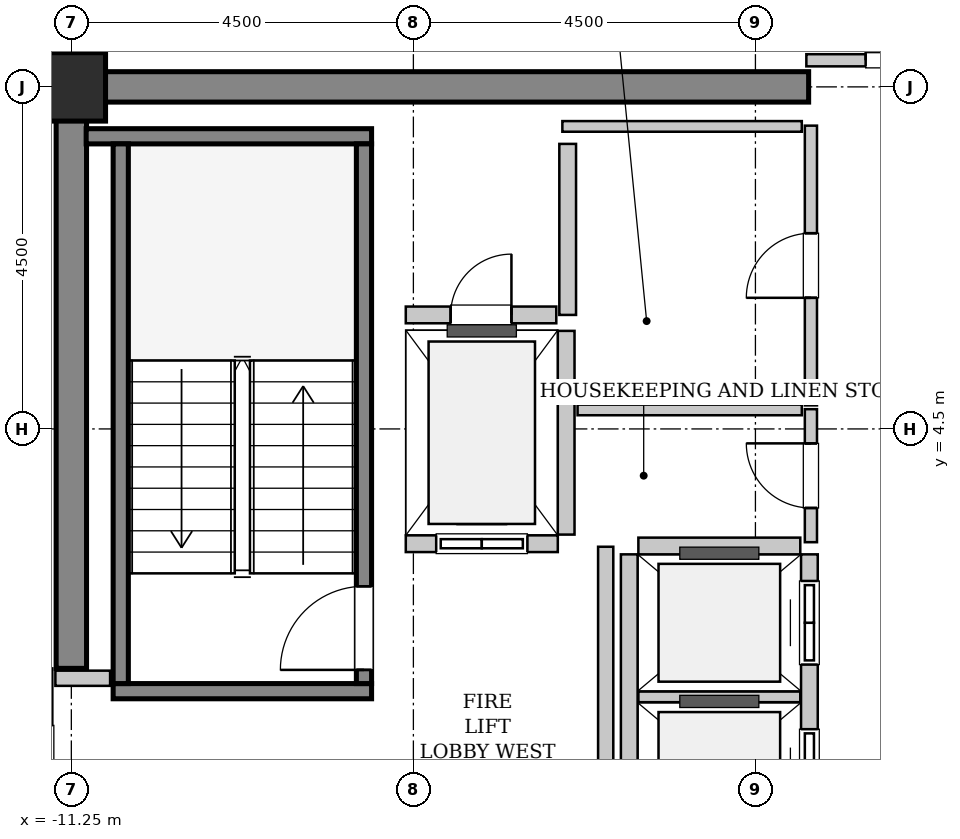
"""IFC4 building model, lengths in metres.
Left out: names, types, materials, properties, quantities, classifications, styles, units other than length and angle.
Written with IfcOpenShell. Run it as: python <this file> out.ifc"""

import sys

from ifc_helpers import new_model, si_unit, direction, frame, frame_2d, origin, origin_2d, place, context, subcontext, project, spatial, rectangle, extrude, source, transform, mapped, element, fill, save


model = new_model("IFC4")
c1 = context("Model", 3, precision=1e-05, world=origin(), true_north=direction((0.0, 1.0)))
c2 = subcontext(c1, "Body", "Model", "MODEL_VIEW")
j1 = project(units=[si_unit("LENGTHUNIT", "METRE"), si_unit("PLANEANGLEUNIT", "RADIAN")], contexts=[c1])
p1 = place(None, origin())
s1 = spatial("IfcSite", under=j1, at=p1, CompositionType="ELEMENT")
p2 = place(p1, origin())
s2 = spatial("IfcBuilding", under=s1, at=p2, CompositionType="ELEMENT")
p3 = place(p2, frame((0.0, 0.0, 345.2)))
s3 = spatial("IfcBuildingStorey", under=s2, at=p3, CompositionType="ELEMENT", Elevation=345.2)
m1 = source(origin(), c2, "Body", "SweptSolid", [
    extrude(rectangle(XDim=9.9, YDim=0.4, at=frame_2d((4.95, 0.0))), origin(), (0.0, 0.0, 1.0), 3.8),
])
p4 = place(p3, frame((-11.45, 9.0, 0.0), z_axis=(0.0, 0.0, 1.0), x_axis=(1.0, 0.0, 0.0)))
e1 = element("IfcWall", 1, at=p4, inside=s3, PredefinedType="SHEAR", context=c2, shape_type="MappedRepresentation", body=[
    mapped(m1, transform((0.0, 0.0, 0.0), x_axis=(1.0, 0.0, 0.0), y_axis=(0.0, 1.0, 0.0), z_axis=(0.0, 0.0, 1.0), scale=1.0)),
])
m2 = source(origin(), c2, "Body", "SweptSolid", [
    extrude(rectangle(XDim=7.45, YDim=0.4, at=frame_2d((3.725, 0.0))), origin(), (0.0, 0.0, 1.0), 3.8),
])
p5 = place(p3, frame((-11.25, 1.35, 0.0), z_axis=(0.0, 0.0, 1.0), x_axis=(0.0, 1.0, 0.0)))
e2 = element("IfcWall", 2, at=p5, inside=s3, PredefinedType="SHEAR", context=c2, shape_type="MappedRepresentation", body=[
    mapped(m2, transform((0.0, 0.0, 0.0), x_axis=(1.0, 0.0, 0.0), y_axis=(0.0, 1.0, 0.0), z_axis=(0.0, 0.0, 1.0), scale=1.0)),
])
m3 = source(origin(), c2, "Body", "SweptSolid", [
    extrude(rectangle(XDim=0.9, YDim=0.9, at=origin_2d()), origin(), (0.0, 0.0, 1.0), 3.8),
])
p6 = place(p3, frame((-11.25, 9.0, 0.0), z_axis=(0.0, 0.0, 1.0), x_axis=(1.0, 0.0, 0.0)))
e3 = element("IfcColumn", 3, at=p6, inside=s3, PredefinedType="COLUMN", context=c2, shape_type="MappedRepresentation", body=[
    mapped(m3, transform((0.0, 0.0, 0.0), x_axis=(1.0, 0.0, 0.0), y_axis=(0.0, 1.0, 0.0), z_axis=(0.0, 0.0, 1.0), scale=1.0)),
])
m4 = source(origin(), c2, "Body", "SweptSolid", [
    extrude(rectangle(XDim=3.4, YDim=0.2, at=frame_2d((1.7, 0.0))), origin(), (0.0, 0.0, 1.0), 3.8),
])
p7 = place(p3, frame((-7.3, 1.05, 0.0), z_axis=(0.0, 0.0, 1.0), x_axis=(-1.0, 0.0, 0.0)))
e4 = element("IfcWall", 4, at=p7, inside=s3, PredefinedType="SOLIDWALL", context=c2, shape_type="MappedRepresentation", body=[
    mapped(m4, transform((0.0, 0.0, 0.0), x_axis=(1.0, 0.0, 0.0), y_axis=(0.0, 1.0, 0.0), z_axis=(0.0, 0.0, 1.0), scale=1.0)),
])
m5 = source(origin(), c2, "Body", "SweptSolid", [
    extrude(rectangle(XDim=3.755, YDim=0.2, at=frame_2d((1.877, 0.0))), origin(), (0.0, 0.0, 1.0), 3.8),
])
p8 = place(p3, frame((-7.3, 8.35, 0.0), z_axis=(0.0, 0.0, 1.0), x_axis=(-1.0, 0.0, 0.0)))
e5 = element("IfcWall", 5, at=p8, inside=s3, PredefinedType="SOLIDWALL", context=c2, shape_type="MappedRepresentation", body=[
    mapped(m5, transform((0.0, 0.0, 0.0), x_axis=(1.0, 0.0, 0.0), y_axis=(0.0, 1.0, 0.0), z_axis=(0.0, 0.0, 1.0), scale=1.0)),
])
m6 = source(origin(), c2, "Body", "SweptSolid", [
    extrude(rectangle(XDim=7.1, YDim=0.2, at=frame_2d((3.55, 0.0))), origin(), (0.0, 0.0, 1.0), 3.8),
])
p9 = place(p3, frame((-7.4, 1.15, 0.0), z_axis=(0.0, 0.0, 1.0), x_axis=(0.0, 1.0, 0.0)))
e6 = element("IfcWall", 6, at=p9, inside=s3, PredefinedType="SOLIDWALL", context=c2, shape_type="MappedRepresentation", body=[
    mapped(m6, transform((0.0, 0.0, 0.0), x_axis=(1.0, 0.0, 0.0), y_axis=(0.0, 1.0, 0.0), z_axis=(0.0, 0.0, 1.0), scale=1.0)),
])
p10 = place(p9, frame((0.18, 0.0, 0.0)))
e7 = element("IfcOpeningElement", 7, at=p10, cuts=e6, PredefinedType="OPENING", context=c2, shape_type="SweptSolid", body=[
    extrude(rectangle(XDim=1.1, YDim=2.15, at=frame_2d((0.55, 1.075))), frame((0.0, 0.11, 0.0), z_axis=(0.0, -1.0, 0.0), x_axis=(1.0, 0.0, 0.0)), (0.0, 0.0, 1.0), 0.22),
])
p11 = place(p3, frame((-10.6, 1.15, 0.0), z_axis=(0.0, 0.0, 1.0), x_axis=(0.0, 1.0, 0.0)))
e8 = element("IfcWall", 8, at=p11, inside=s3, PredefinedType="SOLIDWALL", context=c2, shape_type="MappedRepresentation", body=[
    mapped(m6, transform((0.0, 0.0, 0.0), x_axis=(1.0, 0.0, 0.0), y_axis=(0.0, 1.0, 0.0), z_axis=(0.0, 0.0, 1.0), scale=1.0)),
])
m7 = source(origin(), c2, "Body", "SweptSolid", [
    extrude(rectangle(XDim=2.0, YDim=0.22, at=frame_2d((1.0, 0.0))), origin(), (0.0, 0.0, 1.0), 3.485),
])
p12 = place(p3, frame((-6.85, 2.99, 0.0), z_axis=(0.0, 0.0, 1.0), x_axis=(1.0, 0.0, 0.0)))
e9 = element("IfcWall", 9, at=p12, inside=s3, PredefinedType="SOLIDWALL", context=c2, shape_type="MappedRepresentation", body=[
    mapped(m7, transform((0.0, 0.0, 0.0), x_axis=(1.0, 0.0, 0.0), y_axis=(0.0, 1.0, 0.0), z_axis=(0.0, 0.0, 1.0), scale=1.0)),
])
p13 = place(p12, frame((0.4, 0.0, 0.0)))
e10 = element("IfcOpeningElement", 10, at=p13, cuts=e9, PredefinedType="OPENING", context=c2, shape_type="SweptSolid", body=[
    extrude(rectangle(XDim=1.2, YDim=2.2, at=frame_2d((0.6, 1.1))), frame((0.0, 0.12, 0.0), z_axis=(0.0, -1.0, 0.0), x_axis=(1.0, 0.0, 0.0)), (0.0, 0.0, 1.0), 0.24),
])
m8 = source(origin(), c2, "Body", "SweptSolid", [
    extrude(rectangle(XDim=2.68, YDim=0.22, at=frame_2d((1.34, 0.0))), origin(), (0.0, 0.0, 1.0), 3.485),
])
p14 = place(p3, frame((-4.74, 3.11, 0.0), z_axis=(0.0, 0.0, 1.0), x_axis=(0.0, 1.0, 0.0)))
e11 = element("IfcWall", 11, at=p14, inside=s3, PredefinedType="SOLIDWALL", context=c2, shape_type="MappedRepresentation", body=[
    mapped(m8, transform((0.0, 0.0, 0.0), x_axis=(1.0, 0.0, 0.0), y_axis=(0.0, 1.0, 0.0), z_axis=(0.0, 0.0, 1.0), scale=1.0)),
])
m9 = source(origin(), c2, "Body", "SweptSolid", [
    extrude(rectangle(XDim=5.7, YDim=0.22, at=frame_2d((2.85, 0.0))), origin(), (0.0, 0.0, 1.0), 3.485),
])
p15 = place(p3, frame((-1.54, -2.85, 0.0), z_axis=(0.0, 0.0, 1.0), x_axis=(0.0, 1.0, 0.0)))
e12 = element("IfcWall", 12, at=p15, inside=s3, PredefinedType="SOLIDWALL", context=c2, shape_type="MappedRepresentation", body=[
    mapped(m9, transform((0.0, 0.0, 0.0), x_axis=(1.0, 0.0, 0.0), y_axis=(0.0, 1.0, 0.0), z_axis=(0.0, 0.0, 1.0), scale=1.0)),
])
p16 = place(p15, frame((0.35, 0.0, 0.0)))
e13 = element("IfcOpeningElement", 13, at=p16, cuts=e12, PredefinedType="OPENING", context=c2, shape_type="SweptSolid", body=[
    extrude(rectangle(XDim=1.1, YDim=2.2, at=frame_2d((0.55, 1.1))), frame((0.0, 0.12, 0.0), z_axis=(0.0, -1.0, 0.0), x_axis=(1.0, 0.0, 0.0)), (0.0, 0.0, 1.0), 0.24),
])
p17 = place(p15, frame((2.3, 0.0, 0.0)))
e14 = element("IfcOpeningElement", 14, at=p17, cuts=e12, PredefinedType="OPENING", context=c2, shape_type="SweptSolid", body=[
    extrude(rectangle(XDim=1.1, YDim=2.2, at=frame_2d((0.55, 1.1))), frame((0.0, 0.12, 0.0), z_axis=(0.0, -1.0, 0.0), x_axis=(1.0, 0.0, 0.0)), (0.0, 0.0, 1.0), 0.24),
])
p18 = place(p15, frame((4.25, 0.0, 0.0)))
e15 = element("IfcOpeningElement", 15, at=p18, cuts=e12, PredefinedType="OPENING", context=c2, shape_type="SweptSolid", body=[
    extrude(rectangle(XDim=1.1, YDim=2.2, at=frame_2d((0.55, 1.1))), frame((0.0, 0.12, 0.0), z_axis=(0.0, -1.0, 0.0), x_axis=(1.0, 0.0, 0.0)), (0.0, 0.0, 1.0), 0.24),
])
p19 = place(p3, frame((-3.91, 2.85, 0.0), z_axis=(0.0, 0.0, 1.0), x_axis=(0.0, -1.0, 0.0)))
e16 = element("IfcWall", 16, at=p19, inside=s3, PredefinedType="SOLIDWALL", context=c2, shape_type="MappedRepresentation", body=[
    mapped(m9, transform((0.0, 0.0, 0.0), x_axis=(1.0, 0.0, 0.0), y_axis=(0.0, 1.0, 0.0), z_axis=(0.0, 0.0, 1.0), scale=1.0)),
])
m10 = source(origin(), c2, "Body", "SweptSolid", [
    extrude(rectangle(XDim=2.13, YDim=0.14, at=frame_2d((1.065, 0.0))), origin(), (0.0, 0.0, 1.0), 3.485),
])
p20 = place(p3, frame((-3.79, 0.975, 0.0), z_axis=(0.0, 0.0, 1.0), x_axis=(1.0, 0.0, 0.0)))
e17 = element("IfcWall", 17, at=p20, inside=s3, PredefinedType="PARTITIONING", context=c2, shape_type="MappedRepresentation", body=[
    mapped(m10, transform((0.0, 0.0, 0.0), x_axis=(1.0, 0.0, 0.0), y_axis=(0.0, 1.0, 0.0), z_axis=(0.0, 0.0, 1.0), scale=1.0)),
])
m11 = source(origin(), c2, "Body", "SweptSolid", [
    extrude(rectangle(XDim=2.13, YDim=0.22, at=frame_2d((1.065, 0.0))), origin(), (0.0, 0.0, 1.0), 3.485),
])
p21 = place(p3, frame((-1.66, 2.96, 0.0), z_axis=(0.0, 0.0, 1.0), x_axis=(-1.0, 0.0, 0.0)))
e18 = element("IfcWall", 18, at=p21, inside=s3, PredefinedType="SOLIDWALL", context=c2, shape_type="MappedRepresentation", body=[
    mapped(m11, transform((0.0, 0.0, 0.0), x_axis=(1.0, 0.0, 0.0), y_axis=(0.0, 1.0, 0.0), z_axis=(0.0, 0.0, 1.0), scale=1.0)),
])
m12 = source(origin(), c2, "Body", "SweptSolid", [
    extrude(rectangle(XDim=2.25, YDim=0.22, at=frame_2d((1.125, 0.0))), origin(), (0.0, 0.0, 1.0), 3.485),
])
p22 = place(p3, frame((-4.72, 6.0, 0.0), z_axis=(0.0, 0.0, 1.0), x_axis=(0.0, 1.0, 0.0)))
e19 = element("IfcWall", 19, at=p22, inside=s3, PredefinedType="SOLIDWALL", context=c2, shape_type="MappedRepresentation", body=[
    mapped(m12, transform((0.0, 0.0, 0.0), x_axis=(1.0, 0.0, 0.0), y_axis=(0.0, 1.0, 0.0), z_axis=(0.0, 0.0, 1.0), scale=1.0)),
])
m13 = source(origin(), c2, "Body", "SweptSolid", [
    extrude(rectangle(XDim=1.98, YDim=0.22, at=frame_2d((0.99, 0.0))), origin(), (0.0, 0.0, 1.0), 3.485),
])
p23 = place(p3, frame((-6.85, 6.0, 0.0), z_axis=(0.0, 0.0, 1.0), x_axis=(1.0, 0.0, 0.0)))
e20 = element("IfcWall", 20, at=p23, inside=s3, PredefinedType="SOLIDWALL", context=c2, shape_type="MappedRepresentation", body=[
    mapped(m13, transform((0.0, 0.0, 0.0), x_axis=(1.0, 0.0, 0.0), y_axis=(0.0, 1.0, 0.0), z_axis=(0.0, 0.0, 1.0), scale=1.0)),
])
p24 = place(p23, frame((0.59, 0.0, 0.0)))
e21 = element("IfcOpeningElement", 21, at=p24, cuts=e20, PredefinedType="OPENING", context=c2, shape_type="SweptSolid", body=[
    extrude(rectangle(XDim=0.8, YDim=2.0, at=frame_2d((0.4, 1.0))), frame((0.0, 0.12, 0.0), z_axis=(0.0, -1.0, 0.0), x_axis=(1.0, 0.0, 0.0)), (0.0, 0.0, 1.0), 0.24),
])
m14 = source(origin(), c2, "Body", "SweptSolid", [
    extrude(rectangle(XDim=5.9, YDim=0.2, at=frame_2d((2.95, 0.0))), origin(), (0.0, 0.0, 1.0), 3.485),
])
p25 = place(p3, frame((-4.22, -2.95, 0.0), z_axis=(0.0, 0.0, 1.0), x_axis=(0.0, 1.0, 0.0)))
e22 = element("IfcWall", 22, at=p25, inside=s3, PredefinedType="PARTITIONING", context=c2, shape_type="MappedRepresentation", body=[
    mapped(m14, transform((0.0, 0.0, 0.0), x_axis=(1.0, 0.0, 0.0), y_axis=(0.0, 1.0, 0.0), z_axis=(0.0, 0.0, 1.0), scale=1.0)),
])
m15 = source(origin(), c2, "Body", "SweptSolid", [
    extrude(rectangle(XDim=0.72, YDim=0.2, at=frame_2d((0.36, 0.0))), origin(), (0.0, 0.0, 1.0), 3.485),
])
p26 = place(p3, frame((-11.46, 1.22, 0.0), z_axis=(0.0, 0.0, 1.0), x_axis=(1.0, 0.0, 0.0)))
e23 = element("IfcWall", 23, at=p26, inside=s3, PredefinedType="PARTITIONING", context=c2, shape_type="MappedRepresentation", body=[
    mapped(m15, transform((0.0, 0.0, 0.0), x_axis=(1.0, 0.0, 0.0), y_axis=(0.0, 1.0, 0.0), z_axis=(0.0, 0.0, 1.0), scale=1.0)),
])
m16 = source(origin(), c2, "Body", "SweptSolid", [
    extrude(rectangle(XDim=3.16, YDim=0.16, at=frame_2d((1.58, 0.0))), origin(), (0.0, 0.0, 1.0), 2.575),
])
p27 = place(p3, frame((-1.58, 9.35, 0.0), z_axis=(0.0, 0.0, 1.0), x_axis=(1.0, 0.0, 0.0)))
e24 = element("IfcWall", 24, at=p27, inside=s3, PredefinedType="PARTITIONING", context=c2, shape_type="MappedRepresentation", body=[
    mapped(m16, transform((0.0, 0.0, 0.0), x_axis=(1.0, 0.0, 0.0), y_axis=(0.0, 1.0, 0.0), z_axis=(0.0, 0.0, 1.0), scale=1.0)),
])
p28 = place(p27, frame((0.78, 0.0, 0.0)))
e25 = element("IfcOpeningElement", 25, at=p28, cuts=e24, PredefinedType="OPENING", context=c2, shape_type="SweptSolid", body=[
    extrude(rectangle(XDim=1.6, YDim=2.3, at=frame_2d((0.8, 1.15))), frame((0.0, 0.09, 0.0), z_axis=(0.0, -1.0, 0.0), x_axis=(1.0, 0.0, 0.0)), (0.0, 0.0, 1.0), 0.18),
])
m17 = source(origin(), c2, "Body", "SweptSolid", [
    extrude(rectangle(XDim=1.75, YDim=0.16, at=frame_2d((0.875, 0.0))), origin(), (0.0, 0.0, 1.0), 3.485),
])
p29 = place(p3, frame((-1.52, 3.01, 0.0), z_axis=(0.0, 0.0, 1.0), x_axis=(0.0, 1.0, 0.0)))
e26 = element("IfcWall", 26, at=p29, inside=s3, PredefinedType="PARTITIONING", context=c2, shape_type="MappedRepresentation", body=[
    mapped(m17, transform((0.0, 0.0, 0.0), x_axis=(1.0, 0.0, 0.0), y_axis=(0.0, 1.0, 0.0), z_axis=(0.0, 0.0, 1.0), scale=1.0)),
])
p30 = place(p29, frame((0.45, 0.0, 0.0)))
e27 = element("IfcOpeningElement", 27, at=p30, cuts=e26, PredefinedType="OPENING", context=c2, shape_type="SweptSolid", body=[
    extrude(rectangle(XDim=0.85, YDim=2.1, at=frame_2d((0.425, 1.05))), frame((0.0, 0.09, 0.0), z_axis=(0.0, -1.0, 0.0), x_axis=(1.0, 0.0, 0.0)), (0.0, 0.0, 1.0), 0.18),
])
m18 = source(origin(), c2, "Body", "SweptSolid", [
    extrude(rectangle(XDim=2.95, YDim=0.14, at=frame_2d((1.475, 0.0))), origin(), (0.0, 0.0, 1.0), 3.485),
])
p31 = place(p3, frame((-4.59, 4.75, 0.0), z_axis=(0.0, 0.0, 1.0), x_axis=(1.0, 0.0, 0.0)))
e28 = element("IfcWall", 28, at=p31, inside=s3, PredefinedType="PARTITIONING", context=c2, shape_type="MappedRepresentation", body=[
    mapped(m18, transform((0.0, 0.0, 0.0), x_axis=(1.0, 0.0, 0.0), y_axis=(0.0, 1.0, 0.0), z_axis=(0.0, 0.0, 1.0), scale=1.0)),
])
m19 = source(origin(), c2, "Body", "SweptSolid", [
    extrude(rectangle(XDim=3.68, YDim=0.16, at=frame_2d((1.84, 0.0))), origin(), (0.0, 0.0, 1.0), 3.485),
])
p32 = place(p3, frame((-1.52, 4.81, 0.0), z_axis=(0.0, 0.0, 1.0), x_axis=(0.0, 1.0, 0.0)))
e29 = element("IfcWall", 29, at=p32, inside=s3, PredefinedType="PARTITIONING", context=c2, shape_type="MappedRepresentation", body=[
    mapped(m19, transform((0.0, 0.0, 0.0), x_axis=(1.0, 0.0, 0.0), y_axis=(0.0, 1.0, 0.0), z_axis=(0.0, 0.0, 1.0), scale=1.0)),
])
p33 = place(p32, frame((1.415, 0.0, 0.0)))
e30 = element("IfcOpeningElement", 30, at=p33, cuts=e29, PredefinedType="OPENING", context=c2, shape_type="SweptSolid", body=[
    extrude(rectangle(XDim=0.85, YDim=2.1, at=frame_2d((0.425, 1.05))), frame((0.0, 0.09, 0.0), z_axis=(0.0, -1.0, 0.0), x_axis=(1.0, 0.0, 0.0)), (0.0, 0.0, 1.0), 0.18),
])
m20 = source(origin(), c2, "Body", "SweptSolid", [
    extrude(rectangle(XDim=3.15, YDim=0.14, at=frame_2d((1.575, 0.0))), origin(), (0.0, 0.0, 1.0), 3.485),
])
p34 = place(p3, frame((-4.79, 8.48, 0.0), z_axis=(0.0, 0.0, 1.0), x_axis=(1.0, 0.0, 0.0)))
e31 = element("IfcWall", 31, at=p34, inside=s3, PredefinedType="PARTITIONING", context=c2, shape_type="MappedRepresentation", body=[
    mapped(m20, transform((0.0, 0.0, 0.0), x_axis=(1.0, 0.0, 0.0), y_axis=(0.0, 1.0, 0.0), z_axis=(0.0, 0.0, 1.0), scale=1.0)),
])
m21 = source(origin(), c2, "Body", "SweptSolid", [
    extrude(rectangle(XDim=1.1, YDim=2.15, at=frame_2d((0.55, 1.075))), frame((0.0, 0.025, 0.0), z_axis=(0.0, -1.0, 0.0), x_axis=(1.0, 0.0, 0.0)), (0.0, 0.0, 1.0), 0.05),
])
p35 = place(p10, origin())
e32 = element("IfcDoor", 32, at=p35, inside=s3, OperationType="SINGLE_SWING_LEFT", PredefinedType="DOOR", context=c2, shape_type="MappedRepresentation", body=[
    mapped(m21, transform((0.0, 0.0, 0.0), x_axis=(1.0, 0.0, 0.0), y_axis=(0.0, 1.0, 0.0), z_axis=(0.0, 0.0, 1.0), scale=1.0)),
])
fill(e7, e32)
m22 = source(origin(), c2, "Body", "SweptSolid", [
    extrude(rectangle(XDim=1.2, YDim=2.2, at=frame_2d((0.6, 1.1))), frame((0.0, 0.025, 0.0), z_axis=(0.0, -1.0, 0.0), x_axis=(1.0, 0.0, 0.0)), (0.0, 0.0, 1.0), 0.05),
])
p36 = place(p13, origin())
e33 = element("IfcDoor", 33, at=p36, inside=s3, OperationType="SLIDING_TO_LEFT", PredefinedType="DOOR", context=c2, shape_type="MappedRepresentation", body=[
    mapped(m22, transform((0.0, 0.0, 0.0), x_axis=(1.0, 0.0, 0.0), y_axis=(0.0, 1.0, 0.0), z_axis=(0.0, 0.0, 1.0), scale=1.0)),
])
fill(e10, e33)
m23 = source(origin(), c2, "Body", "SweptSolid", [
    extrude(rectangle(XDim=1.1, YDim=2.2, at=frame_2d((0.55, 1.1))), frame((0.0, 0.025, 0.0), z_axis=(0.0, -1.0, 0.0), x_axis=(1.0, 0.0, 0.0)), (0.0, 0.0, 1.0), 0.05),
])
p37 = place(p17, origin())
e34 = element("IfcDoor", 34, at=p37, inside=s3, OperationType="DOUBLE_DOOR_SLIDING", PredefinedType="DOOR", context=c2, shape_type="MappedRepresentation", body=[
    mapped(m23, transform((0.0, 0.0, 0.0), x_axis=(1.0, 0.0, 0.0), y_axis=(0.0, 1.0, 0.0), z_axis=(0.0, 0.0, 1.0), scale=1.0)),
])
fill(e14, e34)
p38 = place(p18, origin())
e35 = element("IfcDoor", 35, at=p38, inside=s3, OperationType="DOUBLE_DOOR_SLIDING", PredefinedType="DOOR", context=c2, shape_type="MappedRepresentation", body=[
    mapped(m23, transform((0.0, 0.0, 0.0), x_axis=(1.0, 0.0, 0.0), y_axis=(0.0, 1.0, 0.0), z_axis=(0.0, 0.0, 1.0), scale=1.0)),
])
fill(e15, e35)
m24 = source(origin(), c2, "Body", "SweptSolid", [
    extrude(rectangle(XDim=0.8, YDim=2.0, at=frame_2d((0.4, 1.0))), frame((0.0, 0.025, 0.0), z_axis=(0.0, -1.0, 0.0), x_axis=(1.0, 0.0, 0.0)), (0.0, 0.0, 1.0), 0.05),
])
p39 = place(p24, origin())
e36 = element("IfcDoor", 36, at=p39, inside=s3, OperationType="SINGLE_SWING_RIGHT", PredefinedType="TRAPDOOR", context=c2, shape_type="MappedRepresentation", body=[
    mapped(m24, transform((0.0, 0.0, 0.0), x_axis=(1.0, 0.0, 0.0), y_axis=(0.0, 1.0, 0.0), z_axis=(0.0, 0.0, 1.0), scale=1.0)),
])
fill(e21, e36)
m25 = source(origin(), c2, "Body", "SweptSolid", [
    extrude(rectangle(XDim=1.6, YDim=2.3, at=frame_2d((0.8, 1.15))), frame((0.0, 0.025, 0.0), z_axis=(0.0, -1.0, 0.0), x_axis=(1.0, 0.0, 0.0)), (0.0, 0.0, 1.0), 0.05),
])
p40 = place(p28, origin())
e37 = element("IfcDoor", 37, at=p40, inside=s3, OperationType="DOUBLE_DOOR_SINGLE_SWING", PredefinedType="DOOR", context=c2, shape_type="MappedRepresentation", body=[
    mapped(m25, transform((0.0, 0.0, 0.0), x_axis=(1.0, 0.0, 0.0), y_axis=(0.0, 1.0, 0.0), z_axis=(0.0, 0.0, 1.0), scale=1.0)),
])
fill(e25, e37)
m26 = source(origin(), c2, "Body", "SweptSolid", [
    extrude(rectangle(XDim=0.85, YDim=2.1, at=frame_2d((0.425, 1.05))), frame((0.0, 0.025, 0.0), z_axis=(0.0, -1.0, 0.0), x_axis=(1.0, 0.0, 0.0)), (0.0, 0.0, 1.0), 0.05),
])
p41 = place(p30, origin())
e38 = element("IfcDoor", 38, at=p41, inside=s3, OperationType="SINGLE_SWING_RIGHT", PredefinedType="DOOR", context=c2, shape_type="MappedRepresentation", body=[
    mapped(m26, transform((0.0, 0.0, 0.0), x_axis=(1.0, 0.0, 0.0), y_axis=(0.0, 1.0, 0.0), z_axis=(0.0, 0.0, 1.0), scale=1.0)),
])
fill(e27, e38)
p42 = place(p33, origin())
e39 = element("IfcDoor", 39, at=p42, inside=s3, OperationType="SINGLE_SWING_LEFT", PredefinedType="DOOR", context=c2, shape_type="MappedRepresentation", body=[
    mapped(m26, transform((0.0, 0.0, 0.0), x_axis=(1.0, 0.0, 0.0), y_axis=(0.0, 1.0, 0.0), z_axis=(0.0, 0.0, 1.0), scale=1.0)),
])
fill(e30, e39)
save(model, sys.argv[1])
